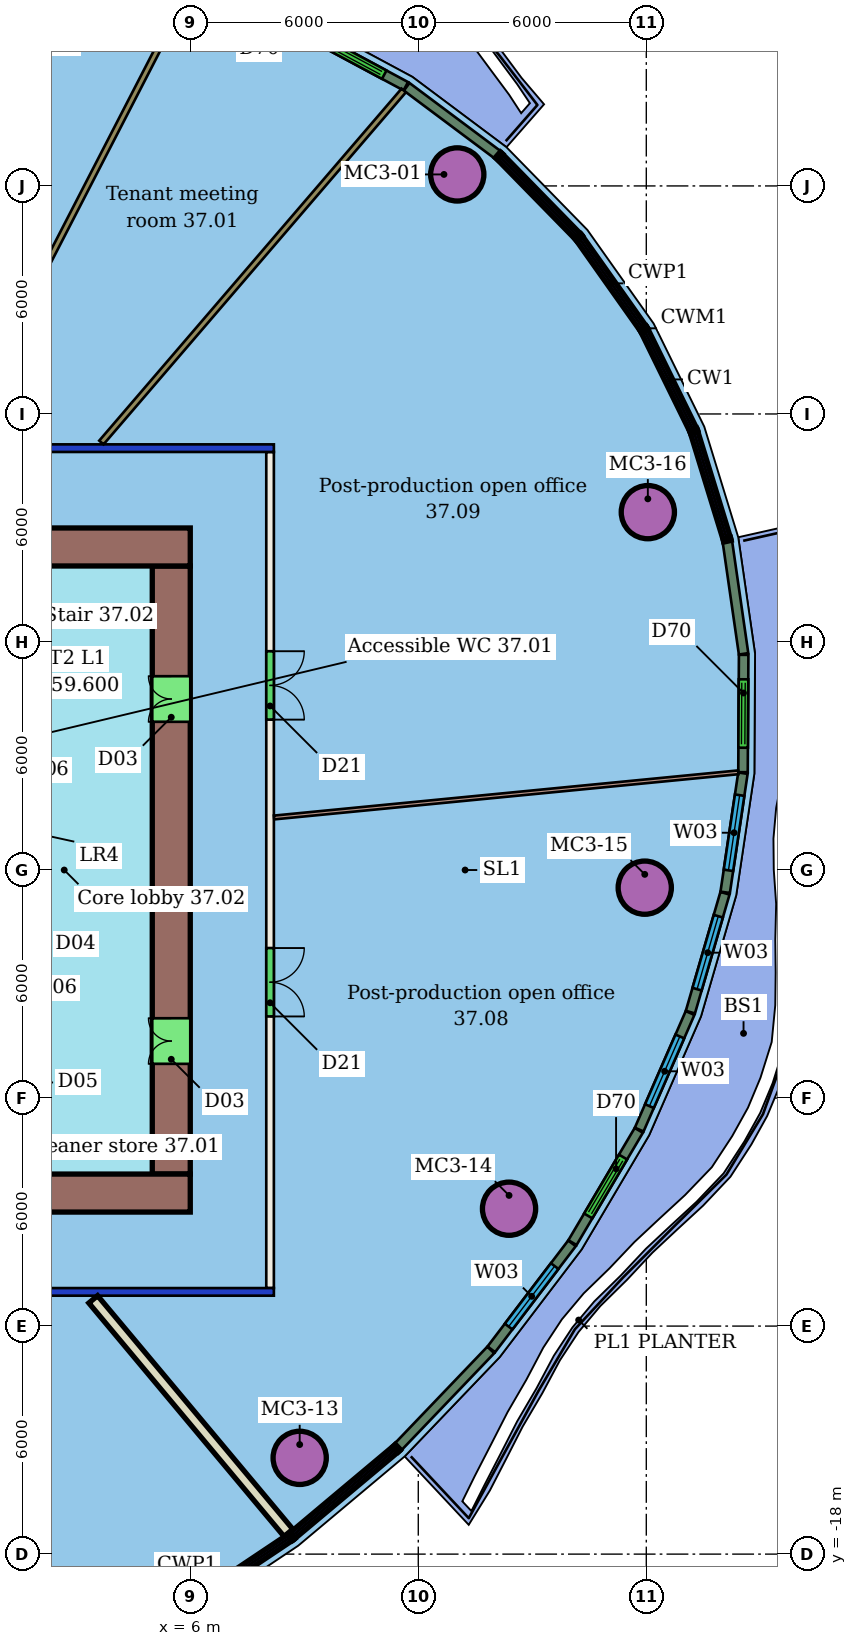
"""IFC4 building model, lengths in metres.
Left out: names, types, materials, properties, quantities, classifications, styles, units other than length and angle.
Written with IfcOpenShell. Run it as: python <this file> out.ifc"""

import sys

from ifc_helpers import new_model, si_unit, direction, frame, frame_2d, origin, origin_2d, place, context, subcontext, project, spatial, rectangle, hollow_circle, extrude, element, fill, save


model = new_model("IFC4")
c1 = context("Model", 3, precision=1e-05, world=origin(), true_north=direction((0.0, 1.0)))
c2 = subcontext(c1, "Body", "Model", "MODEL_VIEW")
j1 = project(units=[si_unit("LENGTHUNIT", "METRE"), si_unit("PLANEANGLEUNIT", "RADIAN")], contexts=[c1])
p1 = place(None, origin())
s1 = spatial("IfcSite", under=j1, at=p1, CompositionType="ELEMENT")
p2 = place(p1, origin())
s2 = spatial("IfcBuilding", under=s1, at=p2, CompositionType="ELEMENT")
p3 = place(p2, frame((0.0, 0.0, 157.8)))
s3 = spatial("IfcBuildingStorey", under=s2, at=p3, CompositionType="ELEMENT", Elevation=157.8)
for number, where, z_axis, x_axis in (
    (1, (13.026, 18.303, 0.0), (0.0, 0.0, 1.0), (1.0, 0.0, 0.0)),
    (2, (8.879, -15.467, 0.0), (0.0, 0.0, 1.0), (1.0, 0.0, 0.0)),
    (3, (14.388, -8.912, 0.0), (0.0, 0.0, 1.0), (1.0, 0.0, 0.0)),
    (4, (17.959, -0.464, 0.0), (0.0, 0.0, 1.0), (1.0, 0.0, 0.0)),
    (5, (18.041, 9.417, 0.0), (0.0, 0.0, 1.0), (1.0, 0.0, 0.0)),
):
    element("IfcColumn", number, at=place(p3, frame(where, z_axis=z_axis, x_axis=x_axis)), inside=s3, PredefinedType="COLUMN", context=c2, shape_type="SweptSolid", body=[
        extrude(hollow_circle(Radius=0.7, WallThickness=0.05, at=origin_2d()), origin(), (0.0, 0.0, 1.0), 3.45),
    ])
p4 = place(p3, frame((8.2, -11.1, 0.0), z_axis=(0.0, 0.0, 1.0), x_axis=(-1.0, 0.0, 0.0)))
e6 = element("IfcWall", 6, at=p4, inside=s3, PredefinedType="PARTITIONING", context=c2, shape_type="SweptSolid", body=[
    extrude(rectangle(XDim=28.4, YDim=0.2, at=frame_2d((14.2, 0.0))), origin(), (0.0, 0.0, 1.0), 3.05),
])
p5 = place(p4, frame((19.745, 0.0, 0.0)))
e7 = element("IfcOpeningElement", 7, at=p5, cuts=e6, PredefinedType="OPENING", context=c2, shape_type="SweptSolid", body=[
    extrude(rectangle(XDim=1.8, YDim=2.4, at=frame_2d((0.9, 1.2))), frame((0.0, 0.11, 0.0), z_axis=(0.0, -1.0, 0.0), x_axis=(1.0, 0.0, 0.0)), (0.0, 0.0, 1.0), 0.22),
])
p6 = place(p4, frame((7.756, 0.0, 0.0)))
e8 = element("IfcOpeningElement", 8, at=p6, cuts=e6, PredefinedType="OPENING", context=c2, shape_type="SweptSolid", body=[
    extrude(rectangle(XDim=1.2, YDim=2.1, at=frame_2d((0.6, 1.05))), frame((0.0, 0.11, 0.0), z_axis=(0.0, -1.0, 0.0), x_axis=(1.0, 0.0, 0.0)), (0.0, 0.0, 1.0), 0.22),
])
p7 = place(p3, frame((-20.2, 11.1, 0.0), z_axis=(0.0, 0.0, 1.0), x_axis=(1.0, 0.0, 0.0)))
e9 = element("IfcWall", 9, at=p7, inside=s3, PredefinedType="PARTITIONING", context=c2, shape_type="SweptSolid", body=[
    extrude(rectangle(XDim=28.4, YDim=0.2, at=frame_2d((14.2, 0.0))), origin(), (0.0, 0.0, 1.0), 3.05),
])
p8 = place(p7, frame((21.032, 0.0, 0.0)))
e10 = element("IfcOpeningElement", 10, at=p8, cuts=e9, PredefinedType="OPENING", context=c2, shape_type="SweptSolid", body=[
    extrude(rectangle(XDim=0.9, YDim=2.1, at=frame_2d((0.45, 1.05))), frame((0.0, 0.11, 0.0), z_axis=(0.0, -1.0, 0.0), x_axis=(1.0, 0.0, 0.0)), (0.0, 0.0, 1.0), 0.22),
])
p9 = place(p7, frame((14.79, 0.0, 0.0)))
e11 = element("IfcOpeningElement", 11, at=p9, cuts=e9, PredefinedType="OPENING", context=c2, shape_type="SweptSolid", body=[
    extrude(rectangle(XDim=1.8, YDim=2.1, at=frame_2d((0.9, 1.05))), frame((0.0, 0.11, 0.0), z_axis=(0.0, -1.0, 0.0), x_axis=(1.0, 0.0, 0.0)), (0.0, 0.0, 1.0), 0.22),
])
p10 = place(p7, frame((4.311, 0.0, 0.0)))
e12 = element("IfcOpeningElement", 12, at=p10, cuts=e9, PredefinedType="OPENING", context=c2, shape_type="SweptSolid", body=[
    extrude(rectangle(XDim=1.1, YDim=2.1, at=frame_2d((0.55, 1.05))), frame((0.0, 0.11, 0.0), z_axis=(0.0, -1.0, 0.0), x_axis=(1.0, 0.0, 0.0)), (0.0, 0.0, 1.0), 0.22),
])
p11 = place(p3, frame((8.1, 11.0, 0.0), z_axis=(0.0, 0.0, 1.0), x_axis=(0.0, -1.0, 0.0)))
e13 = element("IfcWall", 13, at=p11, inside=s3, PredefinedType="PARTITIONING", context=c2, shape_type="SweptSolid", body=[
    extrude(rectangle(XDim=22.0, YDim=0.2, at=frame_2d((11.0, 0.0))), origin(), (0.0, 0.0, 1.0), 3.45),
])
p12 = place(p11, frame((13.053, 0.0, 0.0)))
e14 = element("IfcOpeningElement", 14, at=p12, cuts=e13, PredefinedType="OPENING", context=c2, shape_type="SweptSolid", body=[
    extrude(rectangle(XDim=1.8, YDim=2.1, at=frame_2d((0.9, 1.05))), frame((0.0, 0.11, 0.0), z_axis=(0.0, -1.0, 0.0), x_axis=(1.0, 0.0, 0.0)), (0.0, 0.0, 1.0), 0.22),
])
p13 = place(p11, frame((5.243, 0.0, 0.0)))
e15 = element("IfcOpeningElement", 15, at=p13, cuts=e13, PredefinedType="OPENING", context=c2, shape_type="SweptSolid", body=[
    extrude(rectangle(XDim=1.8, YDim=2.1, at=frame_2d((0.9, 1.05))), frame((0.0, 0.11, 0.0), z_axis=(0.0, -1.0, 0.0), x_axis=(1.0, 0.0, 0.0)), (0.0, 0.0, 1.0), 0.22),
])
p14 = place(p3, frame((11.616, 20.511, 0.0), z_axis=(0.0, 0.0, 1.0), x_axis=(-0.6515386605, -0.758615432135, 0.0)))
e16 = element("IfcWall", 16, at=p14, inside=s3, PredefinedType="PARTITIONING", context=c2, shape_type="SweptSolid", body=[
    extrude(rectangle(XDim=12.21, YDim=0.15, at=frame_2d((6.105, 0.0))), origin(), (0.0, 0.0, 1.0), 3.45),
])
p15 = place(p3, frame((5.905, 23.067, 0.0), z_axis=(0.0, 0.0, 1.0), x_axis=(-0.458603221977, -0.888641145116, 0.0)))
e17 = element("IfcWall", 17, at=p15, inside=s3, PredefinedType="PARTITIONING", context=c2, shape_type="SweptSolid", body=[
    extrude(rectangle(XDim=13.316, YDim=0.15, at=frame_2d((6.658, 0.0))), origin(), (0.0, 0.0, 1.0), 3.45),
])
p16 = place(p3, frame((8.583, -17.44, 0.0), z_axis=(0.0, 0.0, 1.0), x_axis=(-0.641481818131, 0.767138238525, 0.0)))
e18 = element("IfcWall", 18, at=p16, inside=s3, PredefinedType="PARTITIONING", context=c2, shape_type="SweptSolid", body=[
    extrude(rectangle(XDim=8.009, YDim=0.3, at=frame_2d((4.004, 0.0))), origin(), (0.0, 0.0, 1.0), 3.45),
])
p17 = place(p3, frame((20.42, 2.571, 0.0), z_axis=(0.0, 0.0, 1.0), x_axis=(-0.995300294019, -0.096836587746, 0.0)))
e19 = element("IfcWall", 19, at=p17, inside=s3, PredefinedType="PARTITIONING", context=c2, shape_type="SweptSolid", body=[
    extrude(rectangle(XDim=12.273, YDim=0.1, at=frame_2d((6.136, 0.0))), origin(), (0.0, 0.0, 1.0), 3.45),
])
p18 = place(p3, frame((14.08, 18.826, 0.0), z_axis=(0.0, 0.0, 1.0), x_axis=(-0.800953148143, 0.598727028353, 0.0)))
e20 = element("IfcWall", 20, at=p18, inside=s3, PredefinedType="SOLIDWALL", context=c2, shape_type="SweptSolid", body=[
    extrude(rectangle(XDim=2.978, YDim=0.25, at=frame_2d((1.489, 0.0))), origin(), (0.0, 0.0, 1.0), 3.1),
])
p19 = place(p3, frame((11.672, 20.623, 0.0), z_axis=(0.0, 0.0, 1.0), x_axis=(-0.880950483719, 0.473208458541, 0.0)))
e21 = element("IfcWall", 21, at=p19, inside=s3, PredefinedType="SOLIDWALL", context=c2, shape_type="SweptSolid", body=[
    extrude(rectangle(XDim=3.088, YDim=0.25, at=frame_2d((1.544, 0.0))), origin(), (0.0, 0.0, 1.0), 3.1),
])
p20 = place(p19, frame((0.644, 0.0, 0.0)))
e22 = element("IfcOpeningElement", 22, at=p20, cuts=e21, PredefinedType="OPENING", context=c2, shape_type="SweptSolid", body=[
    extrude(rectangle(XDim=1.8, YDim=2.4, at=frame_2d((0.9, 1.2))), frame((0.0, 0.135, 0.0), z_axis=(0.0, -1.0, 0.0), x_axis=(1.0, 0.0, 0.0)), (0.0, 0.0, 1.0), 0.27),
])
p21 = place(p3, frame((11.475, -15.171, 0.0), z_axis=(0.0, 0.0, 1.0), x_axis=(0.691359678914, 0.722510757271, 0.0)))
e23 = element("IfcWall", 23, at=p21, inside=s3, PredefinedType="SOLIDWALL", context=c2, shape_type="SweptSolid", body=[
    extrude(rectangle(XDim=3.519, YDim=0.25, at=frame_2d((1.76, 0.0))), origin(), (0.0, 0.0, 1.0), 3.1),
])
p22 = place(p3, frame((13.922, -12.611, 0.0), z_axis=(0.0, 0.0, 1.0), x_axis=(0.605625422528, 0.795749864962, 0.0)))
e24 = element("IfcWall", 24, at=p22, inside=s3, PredefinedType="SOLIDWALL", context=c2, shape_type="SweptSolid", body=[
    extrude(rectangle(XDim=3.504, YDim=0.25, at=frame_2d((1.752, 0.0))), origin(), (0.0, 0.0, 1.0), 3.1),
])
p23 = place(p22, frame((0.752, 0.0, 0.9)))
e25 = element("IfcOpeningElement", 25, at=p23, cuts=e24, PredefinedType="OPENING", context=c2, shape_type="SweptSolid", body=[
    extrude(rectangle(XDim=2.0, YDim=2.1, at=frame_2d((1.0, 1.05))), frame((0.0, 0.135, 0.0), z_axis=(0.0, -1.0, 0.0), x_axis=(1.0, 0.0, 0.0)), (0.0, 0.0, 1.0), 0.27),
])
p24 = place(p3, frame((16.057, -9.804, 0.0), z_axis=(0.0, 0.0, 1.0), x_axis=(0.508707735762, 0.860939277519, 0.0)))
e26 = element("IfcWall", 26, at=p24, inside=s3, PredefinedType="SOLIDWALL", context=c2, shape_type="SweptSolid", body=[
    extrude(rectangle(XDim=3.431, YDim=0.25, at=frame_2d((1.715, 0.0))), origin(), (0.0, 0.0, 1.0), 3.1),
])
p25 = place(p24, frame((0.816, 0.0, 0.0)))
e27 = element("IfcOpeningElement", 27, at=p25, cuts=e26, PredefinedType="OPENING", context=c2, shape_type="SweptSolid", body=[
    extrude(rectangle(XDim=1.8, YDim=2.4, at=frame_2d((0.9, 1.2))), frame((0.0, 0.135, 0.0), z_axis=(0.0, -1.0, 0.0), x_axis=(1.0, 0.0, 0.0)), (0.0, 0.0, 1.0), 0.27),
])
p26 = place(p3, frame((17.813, -6.83, 0.0), z_axis=(0.0, 0.0, 1.0), x_axis=(0.399984559648, 0.916521877559, 0.0)))
e28 = element("IfcWall", 28, at=p26, inside=s3, PredefinedType="SOLIDWALL", context=c2, shape_type="SweptSolid", body=[
    extrude(rectangle(XDim=3.347, YDim=0.25, at=frame_2d((1.674, 0.0))), origin(), (0.0, 0.0, 1.0), 3.1),
])
p27 = place(p26, frame((0.674, 0.0, 0.9)))
e29 = element("IfcOpeningElement", 29, at=p27, cuts=e28, PredefinedType="OPENING", context=c2, shape_type="SweptSolid", body=[
    extrude(rectangle(XDim=2.0, YDim=2.1, at=frame_2d((1.0, 1.05))), frame((0.0, 0.135, 0.0), z_axis=(0.0, -1.0, 0.0), x_axis=(1.0, 0.0, 0.0)), (0.0, 0.0, 1.0), 0.27),
])
p28 = place(p3, frame((19.16, -3.739, 0.0), z_axis=(0.0, 0.0, 1.0), x_axis=(0.279349638575, 0.960189449759, 0.0)))
e30 = element("IfcWall", 30, at=p28, inside=s3, PredefinedType="SOLIDWALL", context=c2, shape_type="SweptSolid", body=[
    extrude(rectangle(XDim=3.258, YDim=0.25, at=frame_2d((1.629, 0.0))), origin(), (0.0, 0.0, 1.0), 3.1),
])
p29 = place(p28, frame((0.629, 0.0, 0.9)))
e31 = element("IfcOpeningElement", 31, at=p29, cuts=e30, PredefinedType="OPENING", context=c2, shape_type="SweptSolid", body=[
    extrude(rectangle(XDim=2.0, YDim=2.1, at=frame_2d((1.0, 1.05))), frame((0.0, 0.135, 0.0), z_axis=(0.0, -1.0, 0.0), x_axis=(1.0, 0.0, 0.0)), (0.0, 0.0, 1.0), 0.27),
])
p30 = place(p3, frame((20.076, -0.586, 0.0), z_axis=(0.0, 0.0, 1.0), x_axis=(0.147361008263, 0.989082773707, 0.0)))
e32 = element("IfcWall", 32, at=p30, inside=s3, PredefinedType="SOLIDWALL", context=c2, shape_type="SweptSolid", body=[
    extrude(rectangle(XDim=3.169, YDim=0.25, at=frame_2d((1.585, 0.0))), origin(), (0.0, 0.0, 1.0), 3.1),
])
p31 = place(p30, frame((0.585, 0.0, 0.9)))
e33 = element("IfcOpeningElement", 33, at=p31, cuts=e32, PredefinedType="OPENING", context=c2, shape_type="SweptSolid", body=[
    extrude(rectangle(XDim=2.0, YDim=2.1, at=frame_2d((1.0, 1.05))), frame((0.0, 0.135, 0.0), z_axis=(0.0, -1.0, 0.0), x_axis=(1.0, 0.0, 0.0)), (0.0, 0.0, 1.0), 0.27),
])
p32 = place(p3, frame((20.545, 2.574, 0.0), z_axis=(0.0, 0.0, 1.0), x_axis=(0.005534387094, 0.999984685162, 0.0)))
e34 = element("IfcWall", 34, at=p32, inside=s3, PredefinedType="SOLIDWALL", context=c2, shape_type="SweptSolid", body=[
    extrude(rectangle(XDim=3.088, YDim=0.25, at=frame_2d((1.544, 0.0))), origin(), (0.0, 0.0, 1.0), 3.1),
])
p33 = place(p32, frame((0.644, 0.0, 0.0)))
e35 = element("IfcOpeningElement", 35, at=p33, cuts=e34, PredefinedType="OPENING", context=c2, shape_type="SweptSolid", body=[
    extrude(rectangle(XDim=1.8, YDim=2.4, at=frame_2d((0.9, 1.2))), frame((0.0, 0.135, 0.0), z_axis=(0.0, -1.0, 0.0), x_axis=(1.0, 0.0, 0.0)), (0.0, 0.0, 1.0), 0.27),
])
p34 = place(p3, frame((20.56, 5.688, 0.0), z_axis=(0.0, 0.0, 1.0), x_axis=(-0.142970577469, 0.989726939099, 0.0)))
e36 = element("IfcWall", 36, at=p34, inside=s3, PredefinedType="SOLIDWALL", context=c2, shape_type="SweptSolid", body=[
    extrude(rectangle(XDim=2.978, YDim=0.25, at=frame_2d((1.489, 0.0))), origin(), (0.0, 0.0, 1.0), 3.1),
])
p35 = place(p3, frame((6.0, 8.5, 0.0), z_axis=(0.0, 0.0, 1.0), x_axis=(-1.0, 0.0, 0.0)))
e37 = element("IfcWall", 37, at=p35, inside=s3, PredefinedType="SHEAR", context=c2, shape_type="SweptSolid", body=[
    extrude(rectangle(XDim=12.0, YDim=1.0, at=frame_2d((6.0, 0.0))), origin(), (0.0, 0.0, 1.0), 3.3),
])
p36 = place(p35, frame((5.6, 0.0, 0.0)))
e38 = element("IfcOpeningElement", 38, at=p36, cuts=e37, PredefinedType="OPENING", context=c2, shape_type="SweptSolid", body=[
    extrude(rectangle(XDim=1.2, YDim=2.1, at=frame_2d((0.6, 1.05))), frame((0.0, 0.51, 0.0), z_axis=(0.0, -1.0, 0.0), x_axis=(1.0, 0.0, 0.0)), (0.0, 0.0, 1.0), 1.02),
])
p37 = place(p3, frame((-18.0, -8.5, 0.0), z_axis=(0.0, 0.0, 1.0), x_axis=(1.0, 0.0, 0.0)))
e39 = element("IfcWall", 39, at=p37, inside=s3, PredefinedType="SHEAR", context=c2, shape_type="SweptSolid", body=[
    extrude(rectangle(XDim=24.0, YDim=1.0, at=frame_2d((12.0, 0.0))), origin(), (0.0, 0.0, 1.0), 3.3),
])
p38 = place(p37, frame((6.0, 0.0, 0.0)))
e40 = element("IfcOpeningElement", 40, at=p38, cuts=e39, PredefinedType="OPENING", context=c2, shape_type="SweptSolid", body=[
    extrude(rectangle(XDim=1.2, YDim=2.1, at=frame_2d((0.6, 1.05))), frame((0.0, 0.51, 0.0), z_axis=(0.0, -1.0, 0.0), x_axis=(1.0, 0.0, 0.0)), (0.0, 0.0, 1.0), 1.02),
])
p39 = place(p3, frame((5.5, -8.0, 0.0), z_axis=(0.0, 0.0, 1.0), x_axis=(0.0, 1.0, 0.0)))
e41 = element("IfcWall", 41, at=p39, inside=s3, PredefinedType="SHEAR", context=c2, shape_type="SweptSolid", body=[
    extrude(rectangle(XDim=16.0, YDim=1.0, at=frame_2d((8.0, 0.0))), origin(), (0.0, 0.0, 1.0), 3.3),
])
p40 = place(p39, frame((2.9, 0.0, 0.0)))
e42 = element("IfcOpeningElement", 42, at=p40, cuts=e41, PredefinedType="OPENING", context=c2, shape_type="SweptSolid", body=[
    extrude(rectangle(XDim=1.2, YDim=2.1, at=frame_2d((0.6, 1.05))), frame((0.0, 0.51, 0.0), z_axis=(0.0, -1.0, 0.0), x_axis=(1.0, 0.0, 0.0)), (0.0, 0.0, 1.0), 1.02),
])
p41 = place(p39, frame((11.9, 0.0, 0.0)))
e43 = element("IfcOpeningElement", 43, at=p41, cuts=e41, PredefinedType="OPENING", context=c2, shape_type="SweptSolid", body=[
    extrude(rectangle(XDim=1.2, YDim=2.1, at=frame_2d((0.6, 1.05))), frame((0.0, 0.51, 0.0), z_axis=(0.0, -1.0, 0.0), x_axis=(1.0, 0.0, 0.0)), (0.0, 0.0, 1.0), 1.02),
])
p42 = place(p12, origin())
e44 = element("IfcDoor", 44, at=p42, inside=s3, OperationType="DOUBLE_DOOR_SINGLE_SWING", PredefinedType="DOOR", context=c2, shape_type="SweptSolid", body=[
    extrude(rectangle(XDim=1.8, YDim=2.1, at=frame_2d((0.9, 1.05))), frame((0.0, 0.025, 0.0), z_axis=(0.0, -1.0, 0.0), x_axis=(1.0, 0.0, 0.0)), (0.0, 0.0, 1.0), 0.05),
])
fill(e14, e44)
p43 = place(p13, origin())
e45 = element("IfcDoor", 45, at=p43, inside=s3, OperationType="DOUBLE_DOOR_SINGLE_SWING", PredefinedType="DOOR", context=c2, shape_type="SweptSolid", body=[
    extrude(rectangle(XDim=1.8, YDim=2.1, at=frame_2d((0.9, 1.05))), frame((0.0, 0.025, 0.0), z_axis=(0.0, -1.0, 0.0), x_axis=(1.0, 0.0, 0.0)), (0.0, 0.0, 1.0), 0.05),
])
fill(e15, e45)
p44 = place(p20, origin())
e46 = element("IfcDoor", 46, at=p44, inside=s3, OperationType="DOUBLE_DOOR_SLIDING", PredefinedType="DOOR", context=c2, shape_type="SweptSolid", body=[
    extrude(rectangle(XDim=1.8, YDim=2.4, at=frame_2d((0.9, 1.2))), frame((0.0, 0.025, 0.0), z_axis=(0.0, -1.0, 0.0), x_axis=(1.0, 0.0, 0.0)), (0.0, 0.0, 1.0), 0.05),
])
fill(e22, e46)
p45 = place(p23, origin())
e47 = element("IfcWindow", 47, at=p45, inside=s3, PartitioningType="SINGLE_PANEL", PredefinedType="WINDOW", context=c2, shape_type="SweptSolid", body=[
    extrude(rectangle(XDim=2.0, YDim=2.1, at=frame_2d((1.0, 1.05))), frame((0.0, 0.03, 0.0), z_axis=(0.0, -1.0, 0.0), x_axis=(1.0, 0.0, 0.0)), (0.0, 0.0, 1.0), 0.06),
])
fill(e25, e47)
p46 = place(p25, origin())
e48 = element("IfcDoor", 48, at=p46, inside=s3, OperationType="DOUBLE_DOOR_SLIDING", PredefinedType="DOOR", context=c2, shape_type="SweptSolid", body=[
    extrude(rectangle(XDim=1.8, YDim=2.4, at=frame_2d((0.9, 1.2))), frame((0.0, 0.025, 0.0), z_axis=(0.0, -1.0, 0.0), x_axis=(1.0, 0.0, 0.0)), (0.0, 0.0, 1.0), 0.05),
])
fill(e27, e48)
p47 = place(p27, origin())
e49 = element("IfcWindow", 49, at=p47, inside=s3, PartitioningType="SINGLE_PANEL", PredefinedType="WINDOW", context=c2, shape_type="SweptSolid", body=[
    extrude(rectangle(XDim=2.0, YDim=2.1, at=frame_2d((1.0, 1.05))), frame((0.0, 0.03, 0.0), z_axis=(0.0, -1.0, 0.0), x_axis=(1.0, 0.0, 0.0)), (0.0, 0.0, 1.0), 0.06),
])
fill(e29, e49)
p48 = place(p29, origin())
e50 = element("IfcWindow", 50, at=p48, inside=s3, PartitioningType="SINGLE_PANEL", PredefinedType="WINDOW", context=c2, shape_type="SweptSolid", body=[
    extrude(rectangle(XDim=2.0, YDim=2.1, at=frame_2d((1.0, 1.05))), frame((0.0, 0.03, 0.0), z_axis=(0.0, -1.0, 0.0), x_axis=(1.0, 0.0, 0.0)), (0.0, 0.0, 1.0), 0.06),
])
fill(e31, e50)
p49 = place(p31, origin())
e51 = element("IfcWindow", 51, at=p49, inside=s3, PartitioningType="SINGLE_PANEL", PredefinedType="WINDOW", context=c2, shape_type="SweptSolid", body=[
    extrude(rectangle(XDim=2.0, YDim=2.1, at=frame_2d((1.0, 1.05))), frame((0.0, 0.03, 0.0), z_axis=(0.0, -1.0, 0.0), x_axis=(1.0, 0.0, 0.0)), (0.0, 0.0, 1.0), 0.06),
])
fill(e33, e51)
p50 = place(p33, origin())
e52 = element("IfcDoor", 52, at=p50, inside=s3, OperationType="DOUBLE_DOOR_SLIDING", PredefinedType="DOOR", context=c2, shape_type="SweptSolid", body=[
    extrude(rectangle(XDim=1.8, YDim=2.4, at=frame_2d((0.9, 1.2))), frame((0.0, 0.025, 0.0), z_axis=(0.0, -1.0, 0.0), x_axis=(1.0, 0.0, 0.0)), (0.0, 0.0, 1.0), 0.05),
])
fill(e35, e52)
p51 = place(p40, origin())
e53 = element("IfcDoor", 53, at=p51, inside=s3, OperationType="DOUBLE_DOOR_SINGLE_SWING", PredefinedType="NOTDEFINED", context=c2, shape_type="SweptSolid", body=[
    extrude(rectangle(XDim=1.2, YDim=2.1, at=frame_2d((0.6, 1.05))), frame((0.0, 0.025, 0.0), z_axis=(0.0, -1.0, 0.0), x_axis=(1.0, 0.0, 0.0)), (0.0, 0.0, 1.0), 0.05),
])
fill(e42, e53)
p52 = place(p41, origin())
e54 = element("IfcDoor", 54, at=p52, inside=s3, OperationType="DOUBLE_DOOR_SINGLE_SWING", PredefinedType="NOTDEFINED", context=c2, shape_type="SweptSolid", body=[
    extrude(rectangle(XDim=1.2, YDim=2.1, at=frame_2d((0.6, 1.05))), frame((0.0, 0.025, 0.0), z_axis=(0.0, -1.0, 0.0), x_axis=(1.0, 0.0, 0.0)), (0.0, 0.0, 1.0), 0.05),
])
fill(e43, e54)
save(model, sys.argv[1])
